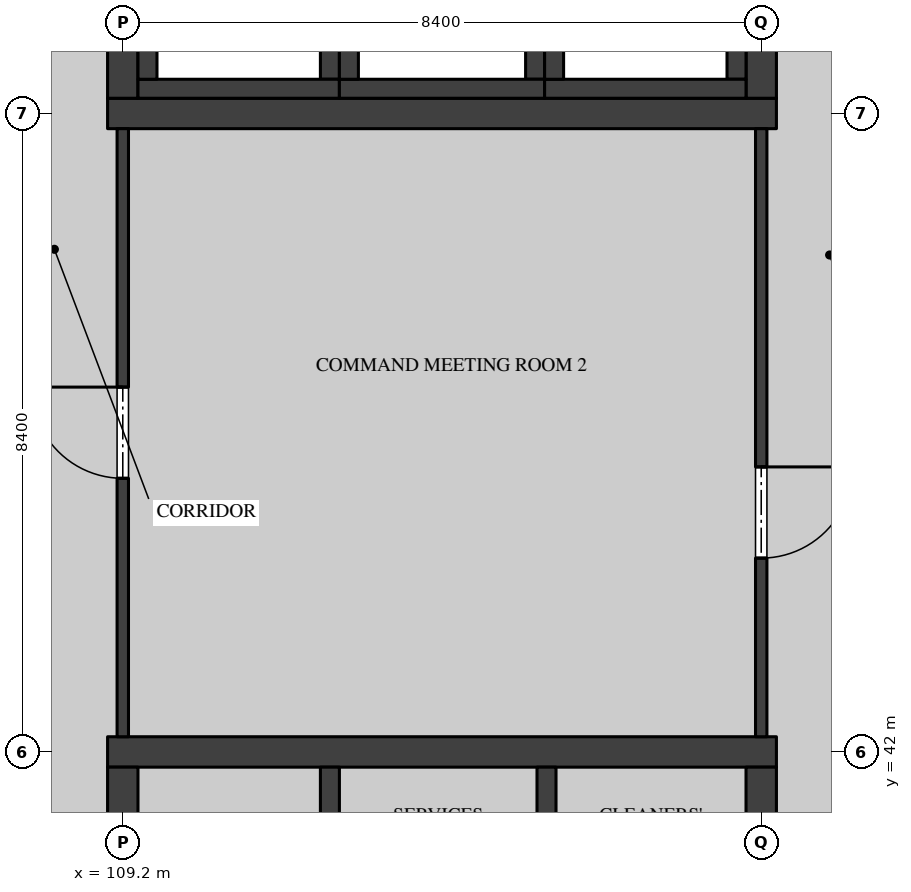
"""IFC4 building model, lengths in metres.
Left out: names, types, materials, properties, quantities, classifications, styles, units other than length and angle.
Written with IfcOpenShell. Run it as: python <this file> out.ifc"""

import sys

from ifc_helpers import new_model, si_unit, direction, frame, frame_2d, origin, place, context, subcontext, project, spatial, rectangle, extrude, element, fill, save


model = new_model("IFC4")
c1 = context("Model", 3, precision=1e-05, world=origin(), true_north=direction((0.0, 1.0)))
c2 = subcontext(c1, "Body", "Model", "MODEL_VIEW")
j1 = project(units=[si_unit("LENGTHUNIT", "METRE"), si_unit("PLANEANGLEUNIT", "RADIAN")], contexts=[c1])
p1 = place(None, origin())
s1 = spatial("IfcSite", under=j1, at=p1, CompositionType="ELEMENT")
p2 = place(p1, origin())
s2 = spatial("IfcBuilding", under=s1, at=p2, CompositionType="ELEMENT")
p3 = place(p2, frame((0.0, 0.0, 36.9)))
s3 = spatial("IfcBuildingStorey", under=s2, at=p3, CompositionType="ELEMENT", Elevation=36.9)
p4 = place(p3, frame((109.0, 50.4, 0.0), z_axis=(0.0, 0.0, 1.0), x_axis=(1.0, 0.0, 0.0)))
e1 = element("IfcWall", 1, at=p4, inside=s3, PredefinedType="SHEAR", context=c2, shape_type="SweptSolid", body=[
    extrude(rectangle(XDim=8.8, YDim=0.4, at=frame_2d((4.4, 0.0))), origin(), (0.0, 0.0, 1.0), 4.37),
])
p5 = place(p3, frame((109.2, 50.6, 0.0), z_axis=(0.0, 0.0, 1.0), x_axis=(0.0, 1.0, 0.0)))
e2 = element("IfcWall", 2, at=p5, inside=s3, PredefinedType="SHEAR", context=c2, shape_type="SweptSolid", body=[
    extrude(rectangle(XDim=8.0, YDim=0.4, at=frame_2d((4.0, 0.0))), origin(), (0.0, 0.0, 1.0), 4.37),
])
p6 = place(p5, frame((3.25, 0.0, 0.0)))
e3 = element("IfcOpeningElement", 3, at=p6, cuts=e2, PredefinedType="OPENING", context=c2, shape_type="SweptSolid", body=[
    extrude(rectangle(XDim=1.2, YDim=2.1, at=frame_2d((0.6, 1.05))), frame((0.0, 0.21, 0.0), z_axis=(0.0, -1.0, 0.0), x_axis=(1.0, 0.0, 0.0)), (0.0, 0.0, 1.0), 0.42),
])
p7 = place(p3, frame((117.6, 50.6, 0.0), z_axis=(0.0, 0.0, 1.0), x_axis=(0.0, 1.0, 0.0)))
e4 = element("IfcWall", 4, at=p7, inside=s3, PredefinedType="SHEAR", context=c2, shape_type="SweptSolid", body=[
    extrude(rectangle(XDim=8.0, YDim=0.4, at=frame_2d((4.0, 0.0))), origin(), (0.0, 0.0, 1.0), 4.37),
])
p8 = place(p7, frame((3.25, 0.0, 0.0)))
e5 = element("IfcOpeningElement", 5, at=p8, cuts=e4, PredefinedType="OPENING", context=c2, shape_type="SweptSolid", body=[
    extrude(rectangle(XDim=1.2, YDim=2.1, at=frame_2d((0.6, 1.05))), frame((0.0, 0.21, 0.0), z_axis=(0.0, -1.0, 0.0), x_axis=(1.0, 0.0, 0.0)), (0.0, 0.0, 1.0), 0.42),
])
p9 = place(p7, frame((6.0, 0.0, 0.0)))
e6 = element("IfcOpeningElement", 6, at=p9, cuts=e4, PredefinedType="OPENING", context=c2, shape_type="SweptSolid", body=[
    extrude(rectangle(XDim=1.2, YDim=2.1, at=frame_2d((0.6, 1.05))), frame((0.0, 0.21, 0.0), z_axis=(0.0, -1.0, 0.0), x_axis=(1.0, 0.0, 0.0)), (0.0, 0.0, 1.0), 0.42),
])
p10 = place(p3, frame((109.0, 42.0, 0.0), z_axis=(0.0, 0.0, 1.0), x_axis=(1.0, 0.0, 0.0)))
e7 = element("IfcWall", 7, at=p10, inside=s3, PredefinedType="SHEAR", context=c2, shape_type="SweptSolid", body=[
    extrude(rectangle(XDim=8.8, YDim=0.4, at=frame_2d((4.4, 0.0))), origin(), (0.0, 0.0, 1.0), 4.37),
])
p11 = place(p3, frame((109.2, 33.8, 0.0), z_axis=(0.0, 0.0, 1.0), x_axis=(0.0, 1.0, 0.0)))
e8 = element("IfcWall", 8, at=p11, inside=s3, PredefinedType="SHEAR", context=c2, shape_type="SweptSolid", body=[
    extrude(rectangle(XDim=8.0, YDim=0.4, at=frame_2d((4.0, 0.0))), origin(), (0.0, 0.0, 1.0), 4.37),
])
p12 = place(p11, frame((3.875, 0.0, 0.0)))
e9 = element("IfcOpeningElement", 9, at=p12, cuts=e8, PredefinedType="OPENING", context=c2, shape_type="SweptSolid", body=[
    extrude(rectangle(XDim=1.2, YDim=2.1, at=frame_2d((0.6, 1.05))), frame((0.0, 0.21, 0.0), z_axis=(0.0, -1.0, 0.0), x_axis=(1.0, 0.0, 0.0)), (0.0, 0.0, 1.0), 0.42),
])
p13 = place(p3, frame((117.6, 33.8, 0.0), z_axis=(0.0, 0.0, 1.0), x_axis=(0.0, 1.0, 0.0)))
e10 = element("IfcWall", 10, at=p13, inside=s3, PredefinedType="SHEAR", context=c2, shape_type="SweptSolid", body=[
    extrude(rectangle(XDim=8.0, YDim=0.4, at=frame_2d((4.0, 0.0))), origin(), (0.0, 0.0, 1.0), 4.37),
])
p14 = place(p13, frame((3.875, 0.0, 0.0)))
e11 = element("IfcOpeningElement", 11, at=p14, cuts=e10, PredefinedType="OPENING", context=c2, shape_type="SweptSolid", body=[
    extrude(rectangle(XDim=1.2, YDim=2.1, at=frame_2d((0.6, 1.05))), frame((0.0, 0.21, 0.0), z_axis=(0.0, -1.0, 0.0), x_axis=(1.0, 0.0, 0.0)), (0.0, 0.0, 1.0), 0.42),
])
p15 = place(p3, frame((111.925, 39.0, 0.0), z_axis=(0.0, 0.0, 1.0), x_axis=(0.0, 1.0, 0.0)))
e12 = element("IfcWall", 12, at=p15, inside=s3, PredefinedType="SOLIDWALL", context=c2, shape_type="SweptSolid", body=[
    extrude(rectangle(XDim=2.8, YDim=0.25, at=frame_2d((1.4, 0.0))), origin(), (0.0, 0.0, 1.0), 4.37),
])
p16 = place(p3, frame((114.775, 39.25, 0.0), z_axis=(0.0, 0.0, 1.0), x_axis=(0.0, 1.0, 0.0)))
e13 = element("IfcWall", 13, at=p16, inside=s3, PredefinedType="SOLIDWALL", context=c2, shape_type="SweptSolid", body=[
    extrude(rectangle(XDim=2.55, YDim=0.25, at=frame_2d((1.275, 0.0))), origin(), (0.0, 0.0, 1.0), 4.37),
])
p17 = place(p3, frame((111.925, 50.85, 0.0), z_axis=(0.0, 0.0, 1.0), x_axis=(0.0, 1.0, 0.0)))
e14 = element("IfcWall", 14, at=p17, inside=s3, PredefinedType="SOLIDWALL", context=c2, shape_type="SweptSolid", body=[
    extrude(rectangle(XDim=2.3, YDim=0.25, at=frame_2d((1.15, 0.0))), origin(), (0.0, 0.0, 1.0), 4.37),
])
p18 = place(p3, frame((109.4, 50.725, 0.0), z_axis=(0.0, 0.0, 1.0), x_axis=(1.0, 0.0, 0.0)))
e15 = element("IfcWall", 15, at=p18, inside=s3, PredefinedType="SOLIDWALL", context=c2, shape_type="SweptSolid", body=[
    extrude(rectangle(XDim=2.65, YDim=0.25, at=frame_2d((1.325, 0.0))), origin(), (0.0, 0.0, 1.0), 4.37),
])
for number, where, z_axis, x_axis in (
    (16, (109.525, 50.85, 0.0), (0.0, 0.0, 1.0), (0.0, 1.0, 0.0)),
    (17, (114.625, 50.85, 0.0), (0.0, 0.0, 1.0), (0.0, 1.0, 0.0)),
):
    element("IfcWall", number, at=place(p3, frame(where, z_axis=z_axis, x_axis=x_axis)), inside=s3, PredefinedType="SOLIDWALL", context=c2, shape_type="SweptSolid", body=[
        extrude(rectangle(XDim=2.3, YDim=0.25, at=frame_2d((1.15, 0.0))), origin(), (0.0, 0.0, 1.0), 4.37),
    ])
p19 = place(p3, frame((112.05, 50.725, 0.0), z_axis=(0.0, 0.0, 1.0), x_axis=(1.0, 0.0, 0.0)))
e18 = element("IfcWall", 18, at=p19, inside=s3, PredefinedType="SOLIDWALL", context=c2, shape_type="SweptSolid", body=[
    extrude(rectangle(XDim=2.7, YDim=0.25, at=frame_2d((1.35, 0.0))), origin(), (0.0, 0.0, 1.0), 4.37),
])
for number, where, z_axis, x_axis in (
    (19, (112.175, 50.85, 0.0), (0.0, 0.0, 1.0), (0.0, 1.0, 0.0)),
    (20, (117.275, 50.85, 0.0), (0.0, 0.0, 1.0), (0.0, 1.0, 0.0)),
):
    element("IfcWall", number, at=place(p3, frame(where, z_axis=z_axis, x_axis=x_axis)), inside=s3, PredefinedType="SOLIDWALL", context=c2, shape_type="SweptSolid", body=[
        extrude(rectangle(XDim=2.3, YDim=0.25, at=frame_2d((1.15, 0.0))), origin(), (0.0, 0.0, 1.0), 4.37),
    ])
p20 = place(p3, frame((114.75, 50.725, 0.0), z_axis=(0.0, 0.0, 1.0), x_axis=(1.0, 0.0, 0.0)))
e21 = element("IfcWall", 21, at=p20, inside=s3, PredefinedType="SOLIDWALL", context=c2, shape_type="SweptSolid", body=[
    extrude(rectangle(XDim=2.65, YDim=0.25, at=frame_2d((1.325, 0.0))), origin(), (0.0, 0.0, 1.0), 4.37),
])
p21 = place(p3, frame((114.875, 50.85, 0.0), z_axis=(0.0, 0.0, 1.0), x_axis=(0.0, 1.0, 0.0)))
e22 = element("IfcWall", 22, at=p21, inside=s3, PredefinedType="SOLIDWALL", context=c2, shape_type="SweptSolid", body=[
    extrude(rectangle(XDim=2.3, YDim=0.25, at=frame_2d((1.15, 0.0))), origin(), (0.0, 0.0, 1.0), 4.37),
])
p22 = place(p3, frame((117.6, 42.2, 0.0), z_axis=(0.0, 0.0, 1.0), x_axis=(0.0, 1.0, 0.0)))
e23 = element("IfcWall", 23, at=p22, inside=s3, PredefinedType="PARTITIONING", context=c2, shape_type="SweptSolid", body=[
    extrude(rectangle(XDim=8.0, YDim=0.15, at=frame_2d((4.0, 0.0))), origin(), (0.0, 0.0, 1.0), 3.817),
])
p23 = place(p22, frame((2.35, 0.0, 0.0)))
e24 = element("IfcOpeningElement", 24, at=p23, cuts=e23, PredefinedType="OPENING", context=c2, shape_type="SweptSolid", body=[
    extrude(rectangle(XDim=1.2, YDim=2.4, at=frame_2d((0.6, 1.2))), frame((0.0, 0.085, 0.0), z_axis=(0.0, -1.0, 0.0), x_axis=(1.0, 0.0, 0.0)), (0.0, 0.0, 1.0), 0.17),
])
p24 = place(p3, frame((109.2, 42.2, 0.0), z_axis=(0.0, 0.0, 1.0), x_axis=(0.0, 1.0, 0.0)))
e25 = element("IfcWall", 25, at=p24, inside=s3, PredefinedType="PARTITIONING", context=c2, shape_type="SweptSolid", body=[
    extrude(rectangle(XDim=8.0, YDim=0.15, at=frame_2d((4.0, 0.0))), origin(), (0.0, 0.0, 1.0), 3.817),
])
p25 = place(p24, frame((3.4, 0.0, 0.0)))
e26 = element("IfcOpeningElement", 26, at=p25, cuts=e25, PredefinedType="OPENING", context=c2, shape_type="SweptSolid", body=[
    extrude(rectangle(XDim=1.2, YDim=2.4, at=frame_2d((0.6, 1.2))), frame((0.0, 0.085, 0.0), z_axis=(0.0, -1.0, 0.0), x_axis=(1.0, 0.0, 0.0)), (0.0, 0.0, 1.0), 0.17),
])
p26 = place(p23, frame((1.2, 0.0, 0.0), z_axis=(0.0, 0.0, 1.0), x_axis=(-1.0, 0.0, 0.0)))
e27 = element("IfcDoor", 27, at=p26, inside=s3, OperationType="SINGLE_SWING_RIGHT", PredefinedType="DOOR", context=c2, shape_type="SweptSolid", body=[
    extrude(rectangle(XDim=1.2, YDim=2.4, at=frame_2d((0.6, 1.2))), frame((0.0, 0.025, 0.0), z_axis=(0.0, -1.0, 0.0), x_axis=(1.0, 0.0, 0.0)), (0.0, 0.0, 1.0), 0.05),
])
fill(e24, e27)
p27 = place(p25, origin())
e28 = element("IfcDoor", 28, at=p27, inside=s3, OperationType="SINGLE_SWING_LEFT", PredefinedType="DOOR", context=c2, shape_type="SweptSolid", body=[
    extrude(rectangle(XDim=1.2, YDim=2.4, at=frame_2d((0.6, 1.2))), frame((0.0, 0.025, 0.0), z_axis=(0.0, -1.0, 0.0), x_axis=(1.0, 0.0, 0.0)), (0.0, 0.0, 1.0), 0.05),
])
fill(e26, e28)
save(model, sys.argv[1])
